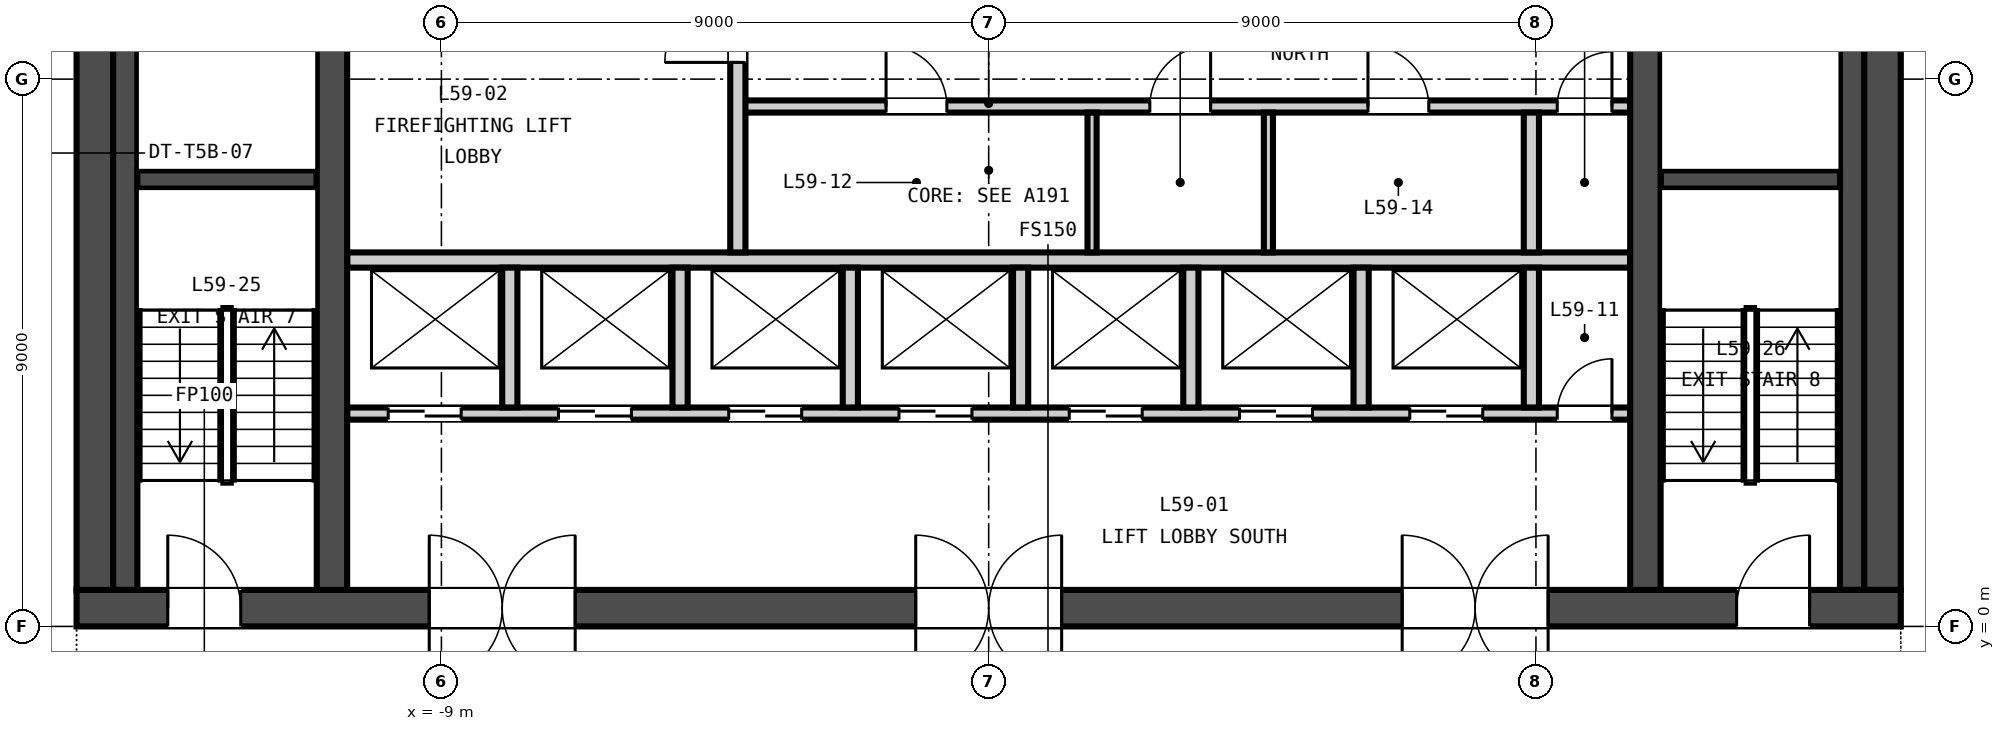
"""IFC4 building model, lengths in metres.
Left out: names, types, materials, properties, quantities, classifications, styles, units other than length and angle.
Written with IfcOpenShell. Run it as: python <this file> out.ifc"""

import sys

from ifc_helpers import new_model, si_unit, direction, frame, frame_2d, origin, place, context, subcontext, project, spatial, rectangle, extrude, element, fill, save


model = new_model("IFC4")
c1 = context("Model", 3, precision=1e-05, world=origin(), true_north=direction((0.0, 1.0)))
c2 = subcontext(c1, "Body", "Model", "MODEL_VIEW")
j1 = project(units=[si_unit("LENGTHUNIT", "METRE"), si_unit("PLANEANGLEUNIT", "RADIAN")], contexts=[c1])
p1 = place(None, origin())
s1 = spatial("IfcSite", under=j1, at=p1, CompositionType="ELEMENT")
p2 = place(p1, origin())
s2 = spatial("IfcBuilding", under=s1, at=p2, CompositionType="ELEMENT")
p3 = place(p2, frame((0.0, 0.0, 234.55)))
s3 = spatial("IfcBuildingStorey", under=s2, at=p3, CompositionType="ELEMENT", Elevation=234.55)
p4 = place(p3, frame((-15.0, 0.3, -0.15), z_axis=(0.0, 0.0, 1.0), x_axis=(1.0, 0.0, 0.0)))
e1 = element("IfcWall", 1, at=p4, inside=s3, PredefinedType="SOLIDWALL", context=c2, shape_type="SweptSolid", body=[
    extrude(rectangle(XDim=30.0, YDim=0.6, at=frame_2d((15.0, 0.0))), origin(), (0.0, 0.0, 1.0), 3.65),
])
p5 = place(p4, frame((5.8, 0.0, 0.15)))
e2 = element("IfcOpeningElement", 2, at=p5, cuts=e1, PredefinedType="OPENING", context=c2, shape_type="SweptSolid", body=[
    extrude(rectangle(XDim=2.4, YDim=2.4, at=frame_2d((1.2, 1.2))), frame((0.0, 0.31, 0.0), z_axis=(0.0, -1.0, 0.0), x_axis=(1.0, 0.0, 0.0)), (0.0, 0.0, 1.0), 0.62),
])
p6 = place(p4, frame((13.8, 0.0, 0.15)))
e3 = element("IfcOpeningElement", 3, at=p6, cuts=e1, PredefinedType="OPENING", context=c2, shape_type="SweptSolid", body=[
    extrude(rectangle(XDim=2.4, YDim=2.4, at=frame_2d((1.2, 1.2))), frame((0.0, 0.31, 0.0), z_axis=(0.0, -1.0, 0.0), x_axis=(1.0, 0.0, 0.0)), (0.0, 0.0, 1.0), 0.62),
])
p7 = place(p4, frame((21.8, 0.0, 0.15)))
e4 = element("IfcOpeningElement", 4, at=p7, cuts=e1, PredefinedType="OPENING", context=c2, shape_type="SweptSolid", body=[
    extrude(rectangle(XDim=2.4, YDim=2.4, at=frame_2d((1.2, 1.2))), frame((0.0, 0.31, 0.0), z_axis=(0.0, -1.0, 0.0), x_axis=(1.0, 0.0, 0.0)), (0.0, 0.0, 1.0), 0.62),
])
p8 = place(p4, frame((1.5, 0.0, 0.15)))
e5 = element("IfcOpeningElement", 5, at=p8, cuts=e1, PredefinedType="OPENING", context=c2, shape_type="SweptSolid", body=[
    extrude(rectangle(XDim=1.2, YDim=2.1, at=frame_2d((0.6, 1.05))), frame((0.0, 0.31, 0.0), z_axis=(0.0, -1.0, 0.0), x_axis=(1.0, 0.0, 0.0)), (0.0, 0.0, 1.0), 0.62),
])
p9 = place(p4, frame((27.3, 0.0, 0.15)))
e6 = element("IfcOpeningElement", 6, at=p9, cuts=e1, PredefinedType="OPENING", context=c2, shape_type="SweptSolid", body=[
    extrude(rectangle(XDim=1.2, YDim=2.1, at=frame_2d((0.6, 1.05))), frame((0.0, 0.31, 0.0), z_axis=(0.0, -1.0, 0.0), x_axis=(1.0, 0.0, 0.0)), (0.0, 0.0, 1.0), 0.62),
])
for number, where, z_axis, x_axis in (
    (7, (-14.7, 0.6, -0.15), (0.0, 0.0, 1.0), (0.0, 1.0, 0.0)),
    (8, (14.7, 0.6, -0.15), (0.0, 0.0, 1.0), (0.0, 1.0, 0.0)),
):
    element("IfcWall", number, at=place(p3, frame(where, z_axis=z_axis, x_axis=x_axis)), inside=s3, PredefinedType="SOLIDWALL", context=c2, shape_type="SweptSolid", body=[
        extrude(rectangle(XDim=13.8, YDim=0.6, at=frame_2d((6.9, 0.0))), origin(), (0.0, 0.0, 1.0), 3.65),
    ])
for number, where, z_axis, x_axis in (
    (9, (-10.8, 0.6, -0.15), (0.0, 0.0, 1.0), (0.0, 1.0, 0.0)),
    (10, (10.8, 0.6, -0.15), (0.0, 0.0, 1.0), (0.0, 1.0, 0.0)),
):
    element("IfcWall", number, at=place(p3, frame(where, z_axis=z_axis, x_axis=x_axis)), inside=s3, PredefinedType="SOLIDWALL", context=c2, shape_type="SweptSolid", body=[
        extrude(rectangle(XDim=13.8, YDim=0.5, at=frame_2d((6.9, 0.0))), origin(), (0.0, 0.0, 1.0), 3.65),
    ])
p10 = place(p3, frame((-10.55, 3.5, 0.0), z_axis=(0.0, 0.0, 1.0), x_axis=(1.0, 0.0, 0.0)))
e11 = element("IfcWall", 11, at=p10, inside=s3, PredefinedType="PARTITIONING", context=c2, shape_type="SweptSolid", body=[
    extrude(rectangle(XDim=21.1, YDim=0.2, at=frame_2d((10.55, 0.0))), origin(), (0.0, 0.0, 1.0), 3.5),
])
p11 = place(p10, frame((0.675, 0.0, 0.0)))
e12 = element("IfcOpeningElement", 12, at=p11, cuts=e11, PredefinedType="OPENING", context=c2, shape_type="SweptSolid", body=[
    extrude(rectangle(XDim=1.2, YDim=2.1, at=frame_2d((0.6, 1.05))), frame((0.0, 0.11, 0.0), z_axis=(0.0, -1.0, 0.0), x_axis=(1.0, 0.0, 0.0)), (0.0, 0.0, 1.0), 0.22),
])
p12 = place(p10, frame((3.475, 0.0, 0.0)))
e13 = element("IfcOpeningElement", 13, at=p12, cuts=e11, PredefinedType="OPENING", context=c2, shape_type="SweptSolid", body=[
    extrude(rectangle(XDim=1.2, YDim=2.1, at=frame_2d((0.6, 1.05))), frame((0.0, 0.11, 0.0), z_axis=(0.0, -1.0, 0.0), x_axis=(1.0, 0.0, 0.0)), (0.0, 0.0, 1.0), 0.22),
])
p13 = place(p10, frame((6.275, 0.0, 0.0)))
e14 = element("IfcOpeningElement", 14, at=p13, cuts=e11, PredefinedType="OPENING", context=c2, shape_type="SweptSolid", body=[
    extrude(rectangle(XDim=1.2, YDim=2.1, at=frame_2d((0.6, 1.05))), frame((0.0, 0.11, 0.0), z_axis=(0.0, -1.0, 0.0), x_axis=(1.0, 0.0, 0.0)), (0.0, 0.0, 1.0), 0.22),
])
p14 = place(p10, frame((9.075, 0.0, 0.0)))
e15 = element("IfcOpeningElement", 15, at=p14, cuts=e11, PredefinedType="OPENING", context=c2, shape_type="SweptSolid", body=[
    extrude(rectangle(XDim=1.2, YDim=2.1, at=frame_2d((0.6, 1.05))), frame((0.0, 0.11, 0.0), z_axis=(0.0, -1.0, 0.0), x_axis=(1.0, 0.0, 0.0)), (0.0, 0.0, 1.0), 0.22),
])
p15 = place(p10, frame((11.875, 0.0, 0.0)))
e16 = element("IfcOpeningElement", 16, at=p15, cuts=e11, PredefinedType="OPENING", context=c2, shape_type="SweptSolid", body=[
    extrude(rectangle(XDim=1.2, YDim=2.1, at=frame_2d((0.6, 1.05))), frame((0.0, 0.11, 0.0), z_axis=(0.0, -1.0, 0.0), x_axis=(1.0, 0.0, 0.0)), (0.0, 0.0, 1.0), 0.22),
])
p16 = place(p10, frame((14.675, 0.0, 0.0)))
e17 = element("IfcOpeningElement", 17, at=p16, cuts=e11, PredefinedType="OPENING", context=c2, shape_type="SweptSolid", body=[
    extrude(rectangle(XDim=1.2, YDim=2.1, at=frame_2d((0.6, 1.05))), frame((0.0, 0.11, 0.0), z_axis=(0.0, -1.0, 0.0), x_axis=(1.0, 0.0, 0.0)), (0.0, 0.0, 1.0), 0.22),
])
p17 = place(p10, frame((17.475, 0.0, 0.0)))
e18 = element("IfcOpeningElement", 18, at=p17, cuts=e11, PredefinedType="OPENING", context=c2, shape_type="SweptSolid", body=[
    extrude(rectangle(XDim=1.2, YDim=2.1, at=frame_2d((0.6, 1.05))), frame((0.0, 0.11, 0.0), z_axis=(0.0, -1.0, 0.0), x_axis=(1.0, 0.0, 0.0)), (0.0, 0.0, 1.0), 0.22),
])
p18 = place(p10, frame((19.9, 0.0, 0.0)))
e19 = element("IfcOpeningElement", 19, at=p18, cuts=e11, PredefinedType="OPENING", context=c2, shape_type="SweptSolid", body=[
    extrude(rectangle(XDim=0.9, YDim=2.1, at=frame_2d((0.45, 1.05))), frame((0.0, 0.11, 0.0), z_axis=(0.0, -1.0, 0.0), x_axis=(1.0, 0.0, 0.0)), (0.0, 0.0, 1.0), 0.22),
])
p19 = place(p3, frame((-10.55, 6.025, 0.0), z_axis=(0.0, 0.0, 1.0), x_axis=(1.0, 0.0, 0.0)))
e20 = element("IfcWall", 20, at=p19, inside=s3, PredefinedType="PARTITIONING", context=c2, shape_type="SweptSolid", body=[
    extrude(rectangle(XDim=21.1, YDim=0.25, at=frame_2d((10.55, 0.0))), origin(), (0.0, 0.0, 1.0), 3.5),
])
p20 = place(p3, frame((-4.125, 8.55, 0.0), z_axis=(0.0, 0.0, 1.0), x_axis=(1.0, 0.0, 0.0)))
e21 = element("IfcWall", 21, at=p20, inside=s3, PredefinedType="PARTITIONING", context=c2, shape_type="SweptSolid", body=[
    extrude(rectangle(XDim=14.675, YDim=0.2, at=frame_2d((7.337, 0.0))), origin(), (0.0, 0.0, 1.0), 3.5),
])
p21 = place(p20, frame((2.438, 0.0, 0.0)))
e22 = element("IfcOpeningElement", 22, at=p21, cuts=e21, PredefinedType="OPENING", context=c2, shape_type="SweptSolid", body=[
    extrude(rectangle(XDim=1.0, YDim=2.1, at=frame_2d((0.5, 1.05))), frame((0.0, 0.11, 0.0), z_axis=(0.0, -1.0, 0.0), x_axis=(1.0, 0.0, 0.0)), (0.0, 0.0, 1.0), 0.22),
])
p22 = place(p20, frame((6.775, 0.0, 0.0)))
e23 = element("IfcOpeningElement", 23, at=p22, cuts=e21, PredefinedType="OPENING", context=c2, shape_type="SweptSolid", body=[
    extrude(rectangle(XDim=1.0, YDim=2.1, at=frame_2d((0.5, 1.05))), frame((0.0, 0.11, 0.0), z_axis=(0.0, -1.0, 0.0), x_axis=(1.0, 0.0, 0.0)), (0.0, 0.0, 1.0), 0.22),
])
p23 = place(p20, frame((10.363, 0.0, 0.0)))
e24 = element("IfcOpeningElement", 24, at=p23, cuts=e21, PredefinedType="OPENING", context=c2, shape_type="SweptSolid", body=[
    extrude(rectangle(XDim=1.0, YDim=2.1, at=frame_2d((0.5, 1.05))), frame((0.0, 0.11, 0.0), z_axis=(0.0, -1.0, 0.0), x_axis=(1.0, 0.0, 0.0)), (0.0, 0.0, 1.0), 0.22),
])
p24 = place(p20, frame((13.475, 0.0, 0.0)))
e25 = element("IfcOpeningElement", 25, at=p24, cuts=e21, PredefinedType="OPENING", context=c2, shape_type="SweptSolid", body=[
    extrude(rectangle(XDim=0.9, YDim=2.1, at=frame_2d((0.45, 1.05))), frame((0.0, 0.11, 0.0), z_axis=(0.0, -1.0, 0.0), x_axis=(1.0, 0.0, 0.0)), (0.0, 0.0, 1.0), 0.22),
])
p25 = place(p3, frame((-4.125, 6.15, 0.0), z_axis=(0.0, 0.0, 1.0), x_axis=(0.0, 1.0, 0.0)))
e26 = element("IfcWall", 26, at=p25, inside=s3, PredefinedType="PARTITIONING", context=c2, shape_type="SweptSolid", body=[
    extrude(rectangle(XDim=4.95, YDim=0.25, at=frame_2d((2.475, 0.0))), origin(), (0.0, 0.0, 1.0), 3.5),
])
p26 = place(p25, frame((3.125, 0.0, 0.0)))
e27 = element("IfcOpeningElement", 27, at=p26, cuts=e26, PredefinedType="OPENING", context=c2, shape_type="SweptSolid", body=[
    extrude(rectangle(XDim=1.2, YDim=2.1, at=frame_2d((0.6, 1.05))), frame((0.0, 0.135, 0.0), z_axis=(0.0, -1.0, 0.0), x_axis=(1.0, 0.0, 0.0)), (0.0, 0.0, 1.0), 0.27),
])
for number, where, z_axis, x_axis in (
    (28, (-7.875, 3.6, 0.0), (0.0, 0.0, 1.0), (0.0, 1.0, 0.0)),
    (29, (-5.075, 3.6, 0.0), (0.0, 0.0, 1.0), (0.0, 1.0, 0.0)),
    (30, (-2.275, 3.6, 0.0), (0.0, 0.0, 1.0), (0.0, 1.0, 0.0)),
    (31, (0.525, 3.6, 0.0), (0.0, 0.0, 1.0), (0.0, 1.0, 0.0)),
    (32, (3.325, 3.6, 0.0), (0.0, 0.0, 1.0), (0.0, 1.0, 0.0)),
    (33, (6.125, 3.6, 0.0), (0.0, 0.0, 1.0), (0.0, 1.0, 0.0)),
    (34, (8.925, 3.6, 0.0), (0.0, 0.0, 1.0), (0.0, 1.0, 0.0)),
):
    element("IfcWall", number, at=place(p3, frame(where, z_axis=z_axis, x_axis=x_axis)), inside=s3, PredefinedType="PARTITIONING", context=c2, shape_type="SweptSolid", body=[
        extrude(rectangle(XDim=2.3, YDim=0.25, at=frame_2d((1.15, 0.0))), origin(), (0.0, 0.0, 1.0), 3.5),
    ])
for number, where, z_axis, x_axis in (
    (35, (1.7, 6.15, 0.0), (0.0, 0.0, 1.0), (0.0, 1.0, 0.0)),
    (36, (4.6, 6.15, 0.0), (0.0, 0.0, 1.0), (0.0, 1.0, 0.0)),
):
    element("IfcWall", number, at=place(p3, frame(where, z_axis=z_axis, x_axis=x_axis)), inside=s3, PredefinedType="PARTITIONING", context=c2, shape_type="SweptSolid", body=[
        extrude(rectangle(XDim=2.3, YDim=0.15, at=frame_2d((1.15, 0.0))), origin(), (0.0, 0.0, 1.0), 3.5),
    ])
p27 = place(p3, frame((8.925, 6.15, 0.0), z_axis=(0.0, 0.0, 1.0), x_axis=(0.0, 1.0, 0.0)))
e37 = element("IfcWall", 37, at=p27, inside=s3, PredefinedType="PARTITIONING", context=c2, shape_type="SweptSolid", body=[
    extrude(rectangle(XDim=2.3, YDim=0.25, at=frame_2d((1.15, 0.0))), origin(), (0.0, 0.0, 1.0), 3.5),
])
p28 = place(p3, frame((-14.0, 7.35, 0.0), z_axis=(0.0, 0.0, 1.0), x_axis=(1.0, 0.0, 0.0)))
e38 = element("IfcWall", 38, at=p28, inside=s3, PredefinedType="SOLIDWALL", context=c2, shape_type="SweptSolid", body=[
    extrude(rectangle(XDim=2.95, YDim=0.3, at=frame_2d((1.475, 0.0))), origin(), (0.0, 0.0, 1.0), 3.5),
])
p29 = place(p3, frame((-14.2, 0.6, 0.0), z_axis=(0.0, 0.0, 1.0), x_axis=(0.0, 1.0, 0.0)))
e39 = element("IfcWall", 39, at=p29, inside=s3, PredefinedType="SOLIDWALL", context=c2, shape_type="SweptSolid", body=[
    extrude(rectangle(XDim=13.8, YDim=0.4, at=frame_2d((6.9, 0.0))), origin(), (0.0, 0.0, 1.0), 3.5),
])
p30 = place(p3, frame((11.05, 7.35, 0.0), z_axis=(0.0, 0.0, 1.0), x_axis=(1.0, 0.0, 0.0)))
e40 = element("IfcWall", 40, at=p30, inside=s3, PredefinedType="SOLIDWALL", context=c2, shape_type="SweptSolid", body=[
    extrude(rectangle(XDim=2.95, YDim=0.3, at=frame_2d((1.475, 0.0))), origin(), (0.0, 0.0, 1.0), 3.5),
])
p31 = place(p3, frame((14.2, 0.6, 0.0), z_axis=(0.0, 0.0, 1.0), x_axis=(0.0, 1.0, 0.0)))
e41 = element("IfcWall", 41, at=p31, inside=s3, PredefinedType="SOLIDWALL", context=c2, shape_type="SweptSolid", body=[
    extrude(rectangle(XDim=13.8, YDim=0.4, at=frame_2d((6.9, 0.0))), origin(), (0.0, 0.0, 1.0), 3.5),
])
p32 = place(p26, origin())
e42 = element("IfcDoor", 42, at=p32, inside=s3, OperationType="SINGLE_SWING_LEFT", PredefinedType="DOOR", context=c2, shape_type="SweptSolid", body=[
    extrude(rectangle(XDim=1.2, YDim=2.1, at=frame_2d((0.6, 1.05))), frame((0.0, 0.025, 0.0), z_axis=(0.0, -1.0, 0.0), x_axis=(1.0, 0.0, 0.0)), (0.0, 0.0, 1.0), 0.05),
])
fill(e27, e42)
p33 = place(p11, origin())
e43 = element("IfcDoor", 43, at=p33, inside=s3, OperationType="DOUBLE_DOOR_SLIDING", PredefinedType="DOOR", context=c2, shape_type="SweptSolid", body=[
    extrude(rectangle(XDim=1.2, YDim=2.1, at=frame_2d((0.6, 1.05))), frame((0.0, 0.025, 0.0), z_axis=(0.0, -1.0, 0.0), x_axis=(1.0, 0.0, 0.0)), (0.0, 0.0, 1.0), 0.05),
])
fill(e12, e43)
p34 = place(p12, origin())
e44 = element("IfcDoor", 44, at=p34, inside=s3, OperationType="DOUBLE_DOOR_SLIDING", PredefinedType="DOOR", context=c2, shape_type="SweptSolid", body=[
    extrude(rectangle(XDim=1.2, YDim=2.1, at=frame_2d((0.6, 1.05))), frame((0.0, 0.025, 0.0), z_axis=(0.0, -1.0, 0.0), x_axis=(1.0, 0.0, 0.0)), (0.0, 0.0, 1.0), 0.05),
])
fill(e13, e44)
p35 = place(p13, origin())
e45 = element("IfcDoor", 45, at=p35, inside=s3, OperationType="DOUBLE_DOOR_SLIDING", PredefinedType="DOOR", context=c2, shape_type="SweptSolid", body=[
    extrude(rectangle(XDim=1.2, YDim=2.1, at=frame_2d((0.6, 1.05))), frame((0.0, 0.025, 0.0), z_axis=(0.0, -1.0, 0.0), x_axis=(1.0, 0.0, 0.0)), (0.0, 0.0, 1.0), 0.05),
])
fill(e14, e45)
p36 = place(p14, origin())
e46 = element("IfcDoor", 46, at=p36, inside=s3, OperationType="DOUBLE_DOOR_SLIDING", PredefinedType="DOOR", context=c2, shape_type="SweptSolid", body=[
    extrude(rectangle(XDim=1.2, YDim=2.1, at=frame_2d((0.6, 1.05))), frame((0.0, 0.025, 0.0), z_axis=(0.0, -1.0, 0.0), x_axis=(1.0, 0.0, 0.0)), (0.0, 0.0, 1.0), 0.05),
])
fill(e15, e46)
p37 = place(p15, origin())
e47 = element("IfcDoor", 47, at=p37, inside=s3, OperationType="DOUBLE_DOOR_SLIDING", PredefinedType="DOOR", context=c2, shape_type="SweptSolid", body=[
    extrude(rectangle(XDim=1.2, YDim=2.1, at=frame_2d((0.6, 1.05))), frame((0.0, 0.025, 0.0), z_axis=(0.0, -1.0, 0.0), x_axis=(1.0, 0.0, 0.0)), (0.0, 0.0, 1.0), 0.05),
])
fill(e16, e47)
p38 = place(p16, origin())
e48 = element("IfcDoor", 48, at=p38, inside=s3, OperationType="DOUBLE_DOOR_SLIDING", PredefinedType="DOOR", context=c2, shape_type="SweptSolid", body=[
    extrude(rectangle(XDim=1.2, YDim=2.1, at=frame_2d((0.6, 1.05))), frame((0.0, 0.025, 0.0), z_axis=(0.0, -1.0, 0.0), x_axis=(1.0, 0.0, 0.0)), (0.0, 0.0, 1.0), 0.05),
])
fill(e17, e48)
p39 = place(p17, origin())
e49 = element("IfcDoor", 49, at=p39, inside=s3, OperationType="DOUBLE_DOOR_SLIDING", PredefinedType="DOOR", context=c2, shape_type="SweptSolid", body=[
    extrude(rectangle(XDim=1.2, YDim=2.1, at=frame_2d((0.6, 1.05))), frame((0.0, 0.025, 0.0), z_axis=(0.0, -1.0, 0.0), x_axis=(1.0, 0.0, 0.0)), (0.0, 0.0, 1.0), 0.05),
])
fill(e18, e49)
p40 = place(p18, origin())
e50 = element("IfcDoor", 50, at=p40, inside=s3, OperationType="SINGLE_SWING_RIGHT", PredefinedType="DOOR", context=c2, shape_type="SweptSolid", body=[
    extrude(rectangle(XDim=0.9, YDim=2.1, at=frame_2d((0.45, 1.05))), frame((0.0, 0.025, 0.0), z_axis=(0.0, -1.0, 0.0), x_axis=(1.0, 0.0, 0.0)), (0.0, 0.0, 1.0), 0.05),
])
fill(e19, e50)
p41 = place(p21, origin())
e51 = element("IfcDoor", 51, at=p41, inside=s3, OperationType="SINGLE_SWING_LEFT", PredefinedType="DOOR", context=c2, shape_type="SweptSolid", body=[
    extrude(rectangle(XDim=1.0, YDim=2.1, at=frame_2d((0.5, 1.05))), frame((0.0, 0.025, 0.0), z_axis=(0.0, -1.0, 0.0), x_axis=(1.0, 0.0, 0.0)), (0.0, 0.0, 1.0), 0.05),
])
fill(e22, e51)
p42 = place(p22, origin())
e52 = element("IfcDoor", 52, at=p42, inside=s3, OperationType="SINGLE_SWING_RIGHT", PredefinedType="DOOR", context=c2, shape_type="SweptSolid", body=[
    extrude(rectangle(XDim=1.0, YDim=2.1, at=frame_2d((0.5, 1.05))), frame((0.0, 0.025, 0.0), z_axis=(0.0, -1.0, 0.0), x_axis=(1.0, 0.0, 0.0)), (0.0, 0.0, 1.0), 0.05),
])
fill(e23, e52)
p43 = place(p23, origin())
e53 = element("IfcDoor", 53, at=p43, inside=s3, OperationType="SINGLE_SWING_LEFT", PredefinedType="DOOR", context=c2, shape_type="SweptSolid", body=[
    extrude(rectangle(XDim=1.0, YDim=2.1, at=frame_2d((0.5, 1.05))), frame((0.0, 0.025, 0.0), z_axis=(0.0, -1.0, 0.0), x_axis=(1.0, 0.0, 0.0)), (0.0, 0.0, 1.0), 0.05),
])
fill(e24, e53)
p44 = place(p24, origin())
e54 = element("IfcDoor", 54, at=p44, inside=s3, OperationType="SINGLE_SWING_RIGHT", PredefinedType="DOOR", context=c2, shape_type="SweptSolid", body=[
    extrude(rectangle(XDim=0.9, YDim=2.1, at=frame_2d((0.45, 1.05))), frame((0.0, 0.025, 0.0), z_axis=(0.0, -1.0, 0.0), x_axis=(1.0, 0.0, 0.0)), (0.0, 0.0, 1.0), 0.05),
])
fill(e25, e54)
p45 = place(p5, origin())
e55 = element("IfcDoor", 55, at=p45, inside=s3, OperationType="DOUBLE_DOOR_DOUBLE_SWING", PredefinedType="DOOR", context=c2, shape_type="SweptSolid", body=[
    extrude(rectangle(XDim=2.4, YDim=2.4, at=frame_2d((1.2, 1.2))), frame((0.0, 0.025, 0.0), z_axis=(0.0, -1.0, 0.0), x_axis=(1.0, 0.0, 0.0)), (0.0, 0.0, 1.0), 0.05),
])
fill(e2, e55)
p46 = place(p6, origin())
e56 = element("IfcDoor", 56, at=p46, inside=s3, OperationType="DOUBLE_DOOR_DOUBLE_SWING", PredefinedType="DOOR", context=c2, shape_type="SweptSolid", body=[
    extrude(rectangle(XDim=2.4, YDim=2.4, at=frame_2d((1.2, 1.2))), frame((0.0, 0.025, 0.0), z_axis=(0.0, -1.0, 0.0), x_axis=(1.0, 0.0, 0.0)), (0.0, 0.0, 1.0), 0.05),
])
fill(e3, e56)
p47 = place(p7, origin())
e57 = element("IfcDoor", 57, at=p47, inside=s3, OperationType="DOUBLE_DOOR_DOUBLE_SWING", PredefinedType="DOOR", context=c2, shape_type="SweptSolid", body=[
    extrude(rectangle(XDim=2.4, YDim=2.4, at=frame_2d((1.2, 1.2))), frame((0.0, 0.025, 0.0), z_axis=(0.0, -1.0, 0.0), x_axis=(1.0, 0.0, 0.0)), (0.0, 0.0, 1.0), 0.05),
])
fill(e4, e57)
p48 = place(p8, origin())
e58 = element("IfcDoor", 58, at=p48, inside=s3, OperationType="SINGLE_SWING_LEFT", PredefinedType="DOOR", context=c2, shape_type="SweptSolid", body=[
    extrude(rectangle(XDim=1.2, YDim=2.1, at=frame_2d((0.6, 1.05))), frame((0.0, 0.025, 0.0), z_axis=(0.0, -1.0, 0.0), x_axis=(1.0, 0.0, 0.0)), (0.0, 0.0, 1.0), 0.05),
])
fill(e5, e58)
p49 = place(p9, origin())
e59 = element("IfcDoor", 59, at=p49, inside=s3, OperationType="SINGLE_SWING_RIGHT", PredefinedType="DOOR", context=c2, shape_type="SweptSolid", body=[
    extrude(rectangle(XDim=1.2, YDim=2.1, at=frame_2d((0.6, 1.05))), frame((0.0, 0.025, 0.0), z_axis=(0.0, -1.0, 0.0), x_axis=(1.0, 0.0, 0.0)), (0.0, 0.0, 1.0), 0.05),
])
fill(e6, e59)
save(model, sys.argv[1])
